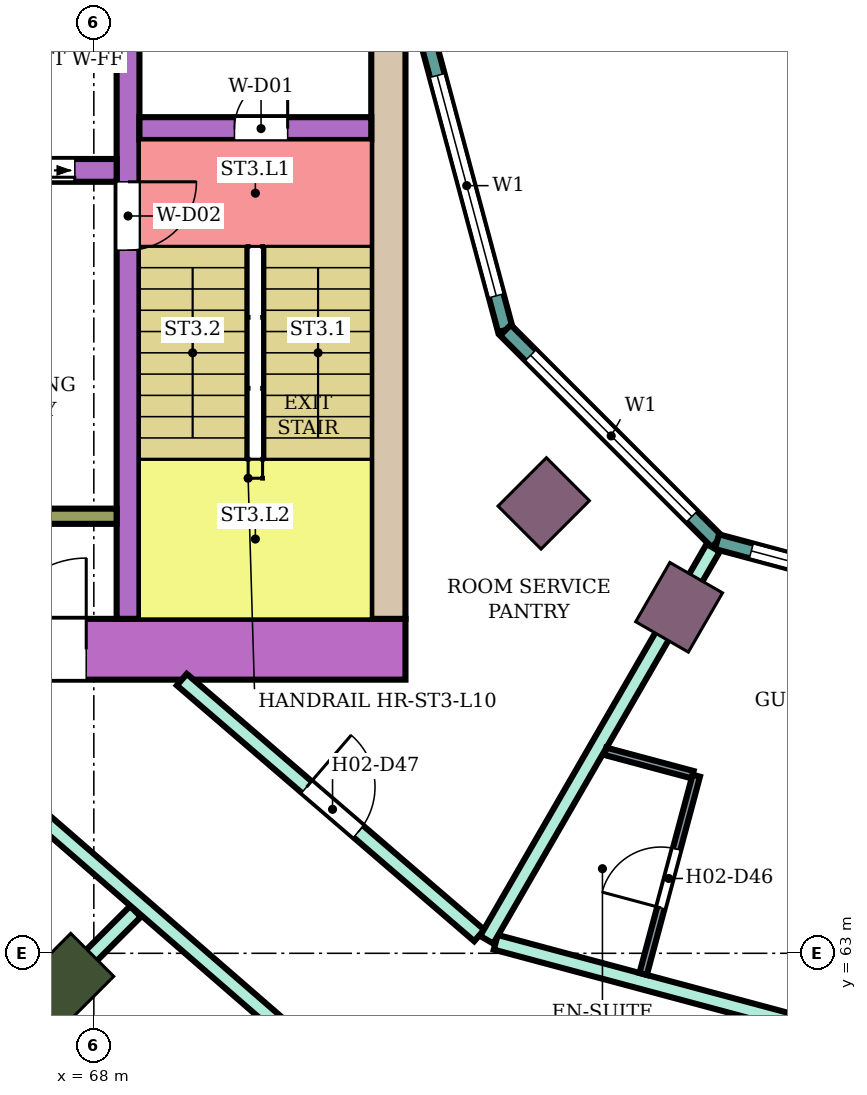
"""IFC4 building model, lengths in metres.
Left out: names, types, materials, properties, quantities, classifications, styles, units other than length and angle.
Written with IfcOpenShell. Run it as: python <this file> out.ifc"""

import sys

from ifc_helpers import new_model, si_unit, direction, frame, frame_2d, origin, origin_2d, place, context, subcontext, project, spatial, rectangle, extrude, element, fill, save


model = new_model("IFC4")
c1 = context("Model", 3, precision=1e-05, world=origin(), true_north=direction((0.0, 1.0)))
c2 = subcontext(c1, "Body", "Model", "MODEL_VIEW")
j1 = project(units=[si_unit("LENGTHUNIT", "METRE"), si_unit("PLANEANGLEUNIT", "RADIAN")], contexts=[c1])
p1 = place(None, origin())
s1 = spatial("IfcSite", under=j1, at=p1, CompositionType="ELEMENT")
p2 = place(p1, origin())
s2 = spatial("IfcBuilding", under=s1, at=p2, CompositionType="ELEMENT")
p3 = place(p2, frame((0.0, 0.0, 47.8)))
s3 = spatial("IfcBuildingStorey", under=s2, at=p3, CompositionType="ELEMENT", Elevation=47.8)
p4 = place(p3, frame((67.555, 62.555, 0.0), z_axis=(0.0, 0.0, 1.0), x_axis=(-0.707106781187, -0.707106781187, 0.0)))
e1 = element("IfcColumn", 1, at=p4, inside=s3, PredefinedType="COLUMN", context=c2, shape_type="SweptSolid", body=[
    extrude(rectangle(XDim=1.2, YDim=0.8, at=origin_2d()), origin(), (0.0, 0.0, 1.0), 3.8),
])
for number, where, z_axis, x_axis in (
    (2, (73.919, 68.919, 0.0), (0.0, 0.0, 1.0), (-0.707, -0.707, 0.0)),
    (3, (75.7, 67.552, 0.0), (0.0, 0.0, 1.0), (-0.5, -0.866, 0.0)),
):
    element("IfcColumn", number, at=place(p3, frame(where, z_axis=z_axis, x_axis=x_axis)), inside=s3, PredefinedType="COLUMN", context=c2, shape_type="SweptSolid", body=[
        extrude(rectangle(XDim=0.9, YDim=0.8, at=origin_2d()), origin(), (0.0, 0.0, 1.0), 3.8),
    ])
p5 = place(p3, frame((72.1, 67.0, 0.0), z_axis=(0.0, 0.0, 1.0), x_axis=(-1.0, 0.0, 0.0)))
e4 = element("IfcWall", 4, at=p5, inside=s3, PredefinedType="SHEAR", context=c2, shape_type="SweptSolid", body=[
    extrude(rectangle(XDim=14.7, YDim=0.8, at=frame_2d((7.35, 0.0))), origin(), (0.0, 0.0, 1.0), 3.48),
])
p6 = place(p5, frame((4.2, 0.0, 0.0)))
e5 = element("IfcOpeningElement", 5, at=p6, cuts=e4, PredefinedType="OPENING", context=c2, shape_type="SweptSolid", body=[
    extrude(rectangle(XDim=2.4, YDim=2.4, at=frame_2d((1.2, 1.2))), frame((0.0, 0.41, 0.0), z_axis=(0.0, -1.0, 0.0), x_axis=(1.0, 0.0, 0.0)), (0.0, 0.0, 1.0), 0.82),
])
p7 = place(p3, frame((71.875, 75.0, 0.0), z_axis=(0.0, 0.0, 1.0), x_axis=(0.0, -1.0, 0.0)))
e6 = element("IfcWall", 6, at=p7, inside=s3, PredefinedType="SHEAR", context=c2, shape_type="SweptSolid", body=[
    extrude(rectangle(XDim=7.6, YDim=0.45, at=frame_2d((3.8, 0.0))), origin(), (0.0, 0.0, 1.0), 3.48),
])
p8 = place(p3, frame((68.45, 75.0, 0.0), z_axis=(0.0, 0.0, 1.0), x_axis=(0.0, -1.0, 0.0)))
e7 = element("IfcWall", 7, at=p8, inside=s3, PredefinedType="SHEAR", context=c2, shape_type="SweptSolid", body=[
    extrude(rectangle(XDim=7.6, YDim=0.3, at=frame_2d((3.8, 0.0))), origin(), (0.0, 0.0, 1.0), 3.48),
])
p9 = place(p8, frame((1.85, 0.0, 0.0)))
e8 = element("IfcOpeningElement", 8, at=p9, cuts=e7, PredefinedType="OPENING", context=c2, shape_type="SweptSolid", body=[
    extrude(rectangle(XDim=0.9, YDim=2.1, at=frame_2d((0.45, 1.05))), frame((0.0, 0.16, 0.0), z_axis=(0.0, -1.0, 0.0), x_axis=(1.0, 0.0, 0.0)), (0.0, 0.0, 1.0), 0.32),
])
p10 = place(p3, frame((71.65, 73.85, 0.0), z_axis=(0.0, 0.0, 1.0), x_axis=(-1.0, 0.0, 0.0)))
e9 = element("IfcWall", 9, at=p10, inside=s3, PredefinedType="SHEAR", context=c2, shape_type="SweptSolid", body=[
    extrude(rectangle(XDim=3.05, YDim=0.3, at=frame_2d((1.525, 0.0))), origin(), (0.0, 0.0, 1.0), 3.48),
])
p11 = place(p10, frame((1.1, 0.0, 0.0)))
e10 = element("IfcOpeningElement", 10, at=p11, cuts=e9, PredefinedType="OPENING", context=c2, shape_type="SweptSolid", body=[
    extrude(rectangle(XDim=0.7, YDim=2.0, at=frame_2d((0.35, 1.0))), frame((0.0, 0.16, 0.0), z_axis=(0.0, -1.0, 0.0), x_axis=(1.0, 0.0, 0.0)), (0.0, 0.0, 1.0), 0.32),
])
p12 = place(p3, frame((68.3, 73.3, 0.0), z_axis=(0.0, 0.0, 1.0), x_axis=(-1.0, 0.0, 0.0)))
e11 = element("IfcWall", 11, at=p12, inside=s3, PredefinedType="SHEAR", context=c2, shape_type="SweptSolid", body=[
    extrude(rectangle(XDim=10.9, YDim=0.3, at=frame_2d((5.45, 0.0))), origin(), (0.0, 0.0, 1.0), 3.48),
])
p13 = place(p12, frame((0.55, 0.0, 0.0)))
e12 = element("IfcOpeningElement", 12, at=p13, cuts=e11, PredefinedType="OPENING", context=c2, shape_type="SweptSolid", body=[
    extrude(rectangle(XDim=1.1, YDim=2.1, at=frame_2d((0.55, 1.05))), frame((0.0, 0.16, 0.0), z_axis=(0.0, -1.0, 0.0), x_axis=(1.0, 0.0, 0.0)), (0.0, 0.0, 1.0), 0.32),
])
p14 = place(p12, frame((8.1, 0.0, 0.0)))
e13 = element("IfcOpeningElement", 13, at=p14, cuts=e11, PredefinedType="OPENING", context=c2, shape_type="SweptSolid", body=[
    extrude(rectangle(XDim=1.0, YDim=2.1, at=frame_2d((0.5, 1.05))), frame((0.0, 0.16, 0.0), z_axis=(0.0, -1.0, 0.0), x_axis=(1.0, 0.0, 0.0)), (0.0, 0.0, 1.0), 0.32),
])
p15 = place(p3, frame((68.3, 68.75, 0.0), z_axis=(0.0, 0.0, 1.0), x_axis=(-1.0, 0.0, 0.0)))
e14 = element("IfcWall", 14, at=p15, inside=s3, PredefinedType="SHEAR", context=c2, shape_type="SweptSolid", body=[
    extrude(rectangle(XDim=4.65, YDim=0.2, at=frame_2d((2.325, 0.0))), origin(), (0.0, 0.0, 1.0), 3.48),
])
p16 = place(p3, frame((72.396, 75.0, 0.0), z_axis=(0.0, 0.0, 1.0), x_axis=(0.258789828301, -0.965933654434, 0.0)))
e15 = element("IfcWall", 15, at=p16, inside=s3, PredefinedType="NOTDEFINED", context=c2, shape_type="SweptSolid", body=[
    extrude(rectangle(XDim=3.936, YDim=0.2, at=frame_2d((1.968, 0.0))), origin(), (0.0, 0.0, 1.0), 3.8),
])
p17 = place(p16, frame((0.468, 0.0, 0.9)))
e16 = element("IfcOpeningElement", 16, at=p17, cuts=e15, PredefinedType="OPENING", context=c2, shape_type="SweptSolid", body=[
    extrude(rectangle(XDim=3.0, YDim=2.3, at=frame_2d((1.5, 1.15))), frame((0.0, 0.11, 0.0), z_axis=(0.0, -1.0, 0.0), x_axis=(1.0, 0.0, 0.0)), (0.0, 0.0, 1.0), 0.22),
])
p18 = place(p3, frame((73.415, 71.198, 0.0), z_axis=(0.0, 0.0, 1.0), x_axis=(0.707106781187, -0.707106781187, 0.0)))
e17 = element("IfcWall", 17, at=p18, inside=s3, PredefinedType="NOTDEFINED", context=c2, shape_type="SweptSolid", body=[
    extrude(rectangle(XDim=3.936, YDim=0.2, at=frame_2d((1.968, 0.0))), origin(), (0.0, 0.0, 1.0), 3.8),
])
p19 = place(p18, frame((0.468, 0.0, 0.9)))
e18 = element("IfcOpeningElement", 18, at=p19, cuts=e17, PredefinedType="OPENING", context=c2, shape_type="SweptSolid", body=[
    extrude(rectangle(XDim=3.0, YDim=2.3, at=frame_2d((1.5, 1.15))), frame((0.0, 0.11, 0.0), z_axis=(0.0, -1.0, 0.0), x_axis=(1.0, 0.0, 0.0)), (0.0, 0.0, 1.0), 0.22),
])
p20 = place(p3, frame((76.198, 68.415, 0.0), z_axis=(0.0, 0.0, 1.0), x_axis=(0.965933654434, -0.258789828301, 0.0)))
e19 = element("IfcWall", 19, at=p20, inside=s3, PredefinedType="NOTDEFINED", context=c2, shape_type="SweptSolid", body=[
    extrude(rectangle(XDim=3.936, YDim=0.2, at=frame_2d((1.968, 0.0))), origin(), (0.0, 0.0, 1.0), 3.8),
])
p21 = place(p20, frame((0.468, 0.0, 0.9)))
e20 = element("IfcOpeningElement", 20, at=p21, cuts=e19, PredefinedType="OPENING", context=c2, shape_type="SweptSolid", body=[
    extrude(rectangle(XDim=3.0, YDim=2.3, at=frame_2d((1.5, 1.15))), frame((0.0, 0.11, 0.0), z_axis=(0.0, -1.0, 0.0), x_axis=(1.0, 0.0, 0.0)), (0.0, 0.0, 1.0), 0.22),
])
p22 = place(p3, frame((63.594, 58.598, 0.0), z_axis=(0.0, 0.0, 1.0), x_axis=(0.707228748718, 0.706984792613, 0.0)))
e21 = element("IfcWall", 21, at=p22, inside=s3, PredefinedType="PARTITIONING", context=c2, shape_type="SweptSolid", body=[
    extrude(rectangle(XDim=7.005, YDim=0.2, at=frame_2d((3.503, 0.0))), origin(), (0.0, 0.0, 1.0), 3.35),
])
p23 = place(p3, frame((67.082, 64.972, 0.0), z_axis=(0.0, 0.0, 1.0), x_axis=(0.755033632617, -0.655686063309, 0.0)))
e22 = element("IfcWall", 22, at=p23, inside=s3, PredefinedType="PARTITIONING", context=c2, shape_type="SweptSolid", body=[
    extrude(rectangle(XDim=6.185, YDim=0.2, at=frame_2d((3.093, 0.0))), origin(), (0.0, 0.0, 1.0), 3.35),
])
p24 = place(p23, frame((4.778, 0.0, 0.0)))
e23 = element("IfcOpeningElement", 23, at=p24, cuts=e22, PredefinedType="OPENING", context=c2, shape_type="SweptSolid", body=[
    extrude(rectangle(XDim=1.1, YDim=2.1, at=frame_2d((0.55, 1.05))), frame((0.0, 0.11, 0.0), z_axis=(0.0, -1.0, 0.0), x_axis=(1.0, 0.0, 0.0)), (0.0, 0.0, 1.0), 0.22),
])
p25 = place(p3, frame((69.158, 66.6, 0.0), z_axis=(0.0, 0.0, 1.0), x_axis=(0.758063092745, -0.652181222835, 0.0)))
e24 = element("IfcWall", 24, at=p25, inside=s3, PredefinedType="PARTITIONING", context=c2, shape_type="SweptSolid", body=[
    extrude(rectangle(XDim=5.16, YDim=0.2, at=frame_2d((2.58, 0.0))), origin(), (0.0, 0.0, 1.0), 3.35),
])
p26 = place(p25, frame((2.165, 0.0, 0.0)))
e25 = element("IfcOpeningElement", 25, at=p26, cuts=e24, PredefinedType="OPENING", context=c2, shape_type="SweptSolid", body=[
    extrude(rectangle(XDim=0.9, YDim=2.1, at=frame_2d((0.45, 1.05))), frame((0.0, 0.11, 0.0), z_axis=(0.0, -1.0, 0.0), x_axis=(1.0, 0.0, 0.0)), (0.0, 0.0, 1.0), 0.22),
])
p27 = place(p3, frame((73.287, 63.145, 0.0), z_axis=(0.0, 0.0, 1.0), x_axis=(0.965854200194, -0.259086209526, 0.0)))
e26 = element("IfcWall", 26, at=p27, inside=s3, PredefinedType="PARTITIONING", context=c2, shape_type="SweptSolid", body=[
    extrude(rectangle(XDim=6.82, YDim=0.2, at=frame_2d((3.41, 0.0))), origin(), (0.0, 0.0, 1.0), 3.35),
])
p28 = place(p27, frame((5.4, 0.0, 0.0)))
e27 = element("IfcOpeningElement", 27, at=p28, cuts=e26, PredefinedType="OPENING", context=c2, shape_type="SweptSolid", body=[
    extrude(rectangle(XDim=1.0, YDim=2.1, at=frame_2d((0.5, 1.05))), frame((0.0, 0.11, 0.0), z_axis=(0.0, -1.0, 0.0), x_axis=(1.0, 0.0, 0.0)), (0.0, 0.0, 1.0), 0.22),
])
p29 = place(p3, frame((73.169, 63.178, 0.0), z_axis=(0.0, 0.0, 1.0), x_axis=(0.50020860964, 0.865904929448, 0.0)))
e28 = element("IfcWall", 28, at=p29, inside=s3, PredefinedType="PARTITIONING", context=c2, shape_type="SweptSolid", body=[
    extrude(rectangle(XDim=5.955, YDim=0.2, at=frame_2d((2.978, 0.0))), origin(), (0.0, 0.0, 1.0), 3.35),
])
p30 = place(p3, frame((74.729, 65.657, 0.0), z_axis=(0.0, 0.0, 1.0), x_axis=(0.965948051503, -0.258736085224, 0.0)))
e29 = element("IfcWall", 29, at=p30, inside=s3, PredefinedType="PARTITIONING", context=c2, shape_type="SweptSolid", body=[
    extrude(rectangle(XDim=1.189, YDim=0.1, at=frame_2d((0.594, 0.0))), origin(), (0.0, 0.0, 1.0), 3.35),
])
p31 = place(p3, frame((75.227, 62.729, 0.0), z_axis=(0.0, 0.0, 1.0), x_axis=(0.258945475746, 0.965891940432, 0.0)))
e30 = element("IfcWall", 30, at=p31, inside=s3, PredefinedType="PARTITIONING", context=c2, shape_type="SweptSolid", body=[
    extrude(rectangle(XDim=2.7, YDim=0.1, at=frame_2d((1.35, 0.0))), origin(), (0.0, 0.0, 1.0), 3.35),
])
p32 = place(p31, frame((0.9, 0.0, 0.0)))
e31 = element("IfcOpeningElement", 31, at=p32, cuts=e30, PredefinedType="OPENING", context=c2, shape_type="SweptSolid", body=[
    extrude(rectangle(XDim=0.8, YDim=2.1, at=frame_2d((0.4, 1.05))), frame((0.0, 0.06, 0.0), z_axis=(0.0, -1.0, 0.0), x_axis=(1.0, 0.0, 0.0)), (0.0, 0.0, 1.0), 0.12),
])
p33 = place(p17, origin())
e32 = element("IfcWindow", 32, at=p33, inside=s3, PartitioningType="SINGLE_PANEL", PredefinedType="WINDOW", context=c2, shape_type="SweptSolid", body=[
    extrude(rectangle(XDim=3.0, YDim=2.3, at=frame_2d((1.5, 1.15))), frame((0.0, 0.03, 0.0), z_axis=(0.0, -1.0, 0.0), x_axis=(1.0, 0.0, 0.0)), (0.0, 0.0, 1.0), 0.06),
])
fill(e16, e32)
p34 = place(p19, origin())
e33 = element("IfcWindow", 33, at=p34, inside=s3, PartitioningType="SINGLE_PANEL", PredefinedType="WINDOW", context=c2, shape_type="SweptSolid", body=[
    extrude(rectangle(XDim=3.0, YDim=2.3, at=frame_2d((1.5, 1.15))), frame((0.0, 0.03, 0.0), z_axis=(0.0, -1.0, 0.0), x_axis=(1.0, 0.0, 0.0)), (0.0, 0.0, 1.0), 0.06),
])
fill(e18, e33)
p35 = place(p21, origin())
e34 = element("IfcWindow", 34, at=p35, inside=s3, PartitioningType="SINGLE_PANEL", PredefinedType="WINDOW", context=c2, shape_type="SweptSolid", body=[
    extrude(rectangle(XDim=3.0, YDim=2.3, at=frame_2d((1.5, 1.15))), frame((0.0, 0.03, 0.0), z_axis=(0.0, -1.0, 0.0), x_axis=(1.0, 0.0, 0.0)), (0.0, 0.0, 1.0), 0.06),
])
fill(e20, e34)
p36 = place(p32, origin())
e35 = element("IfcDoor", 35, at=p36, inside=s3, OperationType="SINGLE_SWING_LEFT", PredefinedType="DOOR", context=c2, shape_type="SweptSolid", body=[
    extrude(rectangle(XDim=0.8, YDim=2.1, at=frame_2d((0.4, 1.05))), frame((0.0, 0.025, 0.0), z_axis=(0.0, -1.0, 0.0), x_axis=(1.0, 0.0, 0.0)), (0.0, 0.0, 1.0), 0.05),
])
fill(e31, e35)
p37 = place(p26, origin())
e36 = element("IfcDoor", 36, at=p37, inside=s3, OperationType="SINGLE_SWING_LEFT", PredefinedType="DOOR", context=c2, shape_type="SweptSolid", body=[
    extrude(rectangle(XDim=0.9, YDim=2.1, at=frame_2d((0.45, 1.05))), frame((0.0, 0.025, 0.0), z_axis=(0.0, -1.0, 0.0), x_axis=(1.0, 0.0, 0.0)), (0.0, 0.0, 1.0), 0.05),
])
fill(e25, e36)
p38 = place(p11, frame((0.7, 0.0, 0.0), z_axis=(0.0, 0.0, 1.0), x_axis=(-1.0, 0.0, 0.0)))
e37 = element("IfcDoor", 37, at=p38, inside=s3, OperationType="SINGLE_SWING_RIGHT", PredefinedType="DOOR", context=c2, shape_type="SweptSolid", body=[
    extrude(rectangle(XDim=0.7, YDim=2.0, at=frame_2d((0.35, 1.0))), frame((0.0, 0.025, 0.0), z_axis=(0.0, -1.0, 0.0), x_axis=(1.0, 0.0, 0.0)), (0.0, 0.0, 1.0), 0.05),
])
fill(e10, e37)
p39 = place(p9, origin())
e38 = element("IfcDoor", 38, at=p39, inside=s3, OperationType="SINGLE_SWING_LEFT", PredefinedType="DOOR", context=c2, shape_type="SweptSolid", body=[
    extrude(rectangle(XDim=0.9, YDim=2.1, at=frame_2d((0.45, 1.05))), frame((0.0, 0.025, 0.0), z_axis=(0.0, -1.0, 0.0), x_axis=(1.0, 0.0, 0.0)), (0.0, 0.0, 1.0), 0.05),
])
fill(e8, e38)
p40 = place(p13, origin())
e39 = element("IfcDoor", 39, at=p40, inside=s3, OperationType="DOUBLE_DOOR_SLIDING", PredefinedType="DOOR", context=c2, shape_type="SweptSolid", body=[
    extrude(rectangle(XDim=1.1, YDim=2.1, at=frame_2d((0.55, 1.05))), frame((0.0, 0.025, 0.0), z_axis=(0.0, -1.0, 0.0), x_axis=(1.0, 0.0, 0.0)), (0.0, 0.0, 1.0), 0.05),
])
fill(e12, e39)
p41 = place(p6, frame((2.4, 0.0, 0.0), z_axis=(0.0, 0.0, 1.0), x_axis=(-1.0, 0.0, 0.0)))
e40 = element("IfcDoor", 40, at=p41, inside=s3, OperationType="DOUBLE_DOOR_SINGLE_SWING", PredefinedType="DOOR", context=c2, shape_type="SweptSolid", body=[
    extrude(rectangle(XDim=2.4, YDim=2.4, at=frame_2d((1.2, 1.2))), frame((0.0, 0.025, 0.0), z_axis=(0.0, -1.0, 0.0), x_axis=(1.0, 0.0, 0.0)), (0.0, 0.0, 1.0), 0.05),
])
fill(e5, e40)
save(model, sys.argv[1])
